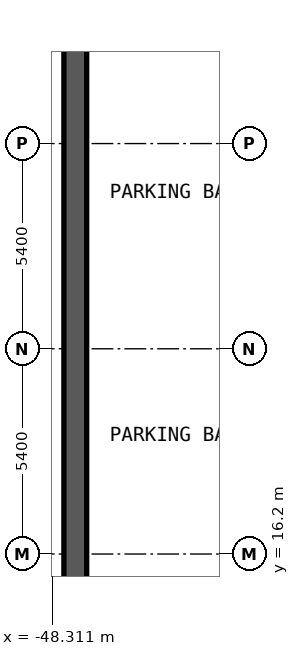
"""IFC4 building model, lengths in metres.
Left out: names, types, materials, properties, quantities, classifications, styles, units other than length and angle.
Written with IfcOpenShell. Run it as: python <this file> out.ifc"""

import sys

from ifc_helpers import new_model, si_unit, direction, frame, frame_2d, origin, place, context, subcontext, project, spatial, rectangle, extrude, element, save


model = new_model("IFC4")
c1 = context("Model", 3, precision=1e-05, world=origin(), true_north=direction((0.0, 1.0)))
c2 = subcontext(c1, "Body", "Model", "MODEL_VIEW")
j1 = project(units=[si_unit("LENGTHUNIT", "METRE"), si_unit("PLANEANGLEUNIT", "RADIAN")], contexts=[c1])
p1 = place(None, origin())
s1 = spatial("IfcSite", under=j1, at=p1, CompositionType="ELEMENT")
p2 = place(p1, origin())
s2 = spatial("IfcBuilding", under=s1, at=p2, CompositionType="ELEMENT")
p3 = place(p2, frame((0.0, 0.0, -4.2)))
s3 = spatial("IfcBuildingStorey", under=s2, at=p3, CompositionType="ELEMENT", Elevation=-4.2)
p4 = place(p3, frame((-47.7, -31.4, 0.0), z_axis=(0.0, 0.0, 1.0), x_axis=(0.0, 1.0, 0.0)))
e1 = element("IfcWall", 1, at=p4, inside=s3, PredefinedType="SOLIDWALL", context=c2, shape_type="SweptSolid", body=[
    extrude(rectangle(XDim=70.8, YDim=0.6, at=frame_2d((35.4, 0.0))), origin(), (0.0, 0.0, 1.0), 4.2),
])
save(model, sys.argv[1])
